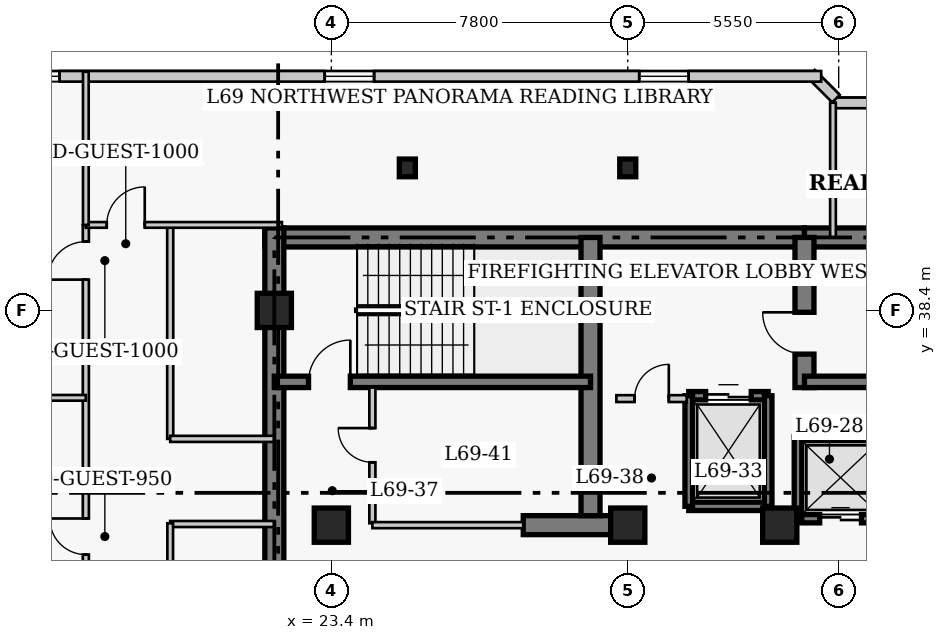
"""IFC4 building model, lengths in metres.
Left out: names, types, materials, properties, quantities, classifications, styles, units other than length and angle.
Written with IfcOpenShell. Run it as: python <this file> out.ifc"""

import sys

from ifc_helpers import new_model, si_unit, direction, frame, frame_2d, origin, origin_2d, place, context, subcontext, project, spatial, rectangle, i_section, extrude, element, fill, save


model = new_model("IFC4")
c1 = context("Model", 3, precision=1e-05, world=origin(), true_north=direction((0.0, 1.0)))
c2 = subcontext(c1, "Body", "Model", "MODEL_VIEW")
j1 = project(units=[si_unit("LENGTHUNIT", "METRE"), si_unit("PLANEANGLEUNIT", "RADIAN")], contexts=[c1])
p1 = place(None, origin())
s1 = spatial("IfcSite", under=j1, at=p1, CompositionType="ELEMENT")
p2 = place(p1, origin())
s2 = spatial("IfcBuilding", under=s1, at=p2, CompositionType="ELEMENT")
p3 = place(p2, frame((0.0, 0.0, 277.4)))
s3 = spatial("IfcBuildingStorey", under=s2, at=p3, CompositionType="ELEMENT", Elevation=277.4)
p4 = place(p3, frame((21.65, 40.32, 0.0), z_axis=(0.0, 0.0, 1.0), x_axis=(1.0, 0.0, 0.0)))
e1 = element("IfcWall", 1, at=p4, inside=s3, PredefinedType="SHEAR", context=c2, shape_type="SweptSolid", body=[
    extrude(rectangle(XDim=14.2, YDim=0.5, at=frame_2d((7.1, 0.0))), origin(), (0.0, 0.0, 1.0), 4.0),
])
p5 = place(p3, frame((35.85, 40.32, 0.0), z_axis=(0.0, 0.0, 1.0), x_axis=(1.0, 0.0, 0.0)))
e2 = element("IfcWall", 2, at=p5, inside=s3, PredefinedType="SHEAR", context=c2, shape_type="SweptSolid", body=[
    extrude(rectangle(XDim=12.6, YDim=0.5, at=frame_2d((6.3, 0.0))), origin(), (0.0, 0.0, 1.0), 4.0),
])
p6 = place(p3, frame((21.9, 27.05, 0.0), z_axis=(0.0, 0.0, 1.0), x_axis=(0.0, 1.0, 0.0)))
e3 = element("IfcWall", 3, at=p6, inside=s3, PredefinedType="SHEAR", context=c2, shape_type="SweptSolid", body=[
    extrude(rectangle(XDim=13.52, YDim=0.5, at=frame_2d((6.76, 0.0))), origin(), (0.0, 0.0, 1.0), 4.0),
])
p7 = place(p3, frame((28.45, 32.75, 0.0), z_axis=(0.0, 0.0, 1.0), x_axis=(1.0, 0.0, 0.0)))
e4 = element("IfcWall", 4, at=p7, inside=s3, PredefinedType="SHEAR", context=c2, shape_type="SweptSolid", body=[
    extrude(rectangle(XDim=2.4, YDim=0.5, at=frame_2d((1.2, 0.0))), origin(), (0.0, 0.0, 1.0), 4.0),
])
p8 = place(p3, frame((30.22, 33.0, 0.0), z_axis=(0.0, 0.0, 1.0), x_axis=(0.0, 1.0, 0.0)))
e5 = element("IfcWall", 5, at=p8, inside=s3, PredefinedType="SHEAR", context=c2, shape_type="SweptSolid", body=[
    extrude(rectangle(XDim=7.32, YDim=0.5, at=frame_2d((3.66, 0.0))), origin(), (0.0, 0.0, 1.0), 4.0),
])
p9 = place(p3, frame((35.85, 36.37, 0.0), z_axis=(0.0, 0.0, 1.0), x_axis=(0.0, 1.0, 0.0)))
e6 = element("IfcWall", 6, at=p9, inside=s3, PredefinedType="SHEAR", context=c2, shape_type="SweptSolid", body=[
    extrude(rectangle(XDim=3.95, YDim=0.5, at=frame_2d((1.975, 0.0))), origin(), (0.0, 0.0, 1.0), 4.0),
])
p10 = place(p9, frame((0.88, 0.0, 0.0)))
e7 = element("IfcOpeningElement", 7, at=p10, cuts=e6, PredefinedType="OPENING", context=c2, shape_type="SweptSolid", body=[
    extrude(rectangle(XDim=1.1, YDim=2.15, at=frame_2d((0.55, 1.075))), frame((0.0, 0.26, 0.0), z_axis=(0.0, -1.0, 0.0), x_axis=(1.0, 0.0, 0.0)), (0.0, 0.0, 1.0), 0.52),
])
p11 = place(p3, frame((21.9, 36.52, 0.0), z_axis=(0.0, 0.0, 1.0), x_axis=(1.0, 0.0, 0.0)))
e8 = element("IfcWall", 8, at=p11, inside=s3, PredefinedType="SHEAR", context=c2, shape_type="SweptSolid", body=[
    extrude(rectangle(XDim=8.32, YDim=0.3, at=frame_2d((4.16, 0.0))), origin(), (0.0, 0.0, 1.0), 4.0),
])
p12 = place(p11, frame((0.9, 0.0, 0.0)))
e9 = element("IfcOpeningElement", 9, at=p12, cuts=e8, PredefinedType="OPENING", context=c2, shape_type="SweptSolid", body=[
    extrude(rectangle(XDim=1.1, YDim=2.15, at=frame_2d((0.55, 1.075))), frame((0.0, 0.16, 0.0), z_axis=(0.0, -1.0, 0.0), x_axis=(1.0, 0.0, 0.0)), (0.0, 0.0, 1.0), 0.32),
])
p13 = place(p3, frame((35.85, 36.52, 0.0), z_axis=(0.0, 0.0, 1.0), x_axis=(1.0, 0.0, 0.0)))
e10 = element("IfcWall", 10, at=p13, inside=s3, PredefinedType="SHEAR", context=c2, shape_type="SweptSolid", body=[
    extrude(rectangle(XDim=8.33, YDim=0.3, at=frame_2d((4.165, 0.0))), origin(), (0.0, 0.0, 1.0), 4.0),
])
for number, where, z_axis, x_axis in (
    (11, (21.9, 38.4, 0.0), (0.0, 0.0, 1.0), (1.0, 0.0, 0.0)),
    (12, (23.4, 32.75, 0.0), (0.0, 0.0, 1.0), (1.0, 0.0, 0.0)),
    (13, (31.2, 32.75, 0.0), (0.0, 0.0, 1.0), (1.0, 0.0, 0.0)),
    (14, (35.2, 32.75, 0.0), (0.0, 0.0, 1.0), (1.0, 0.0, 0.0)),
):
    element("IfcColumn", number, at=place(p3, frame(where, z_axis=z_axis, x_axis=x_axis)), inside=s3, PredefinedType="COLUMN", context=c2, shape_type="SweptSolid", body=[
        extrude(rectangle(XDim=0.9, YDim=0.9, at=origin_2d()), origin(), (0.0, 0.0, 1.0), 4.0),
    ])
for number, where, z_axis, x_axis in (
    (15, (25.4, 42.15, 0.0), (0.0, 0.0, 1.0), (1.0, 0.0, 0.0)),
    (16, (31.2, 42.15, 0.0), (0.0, 0.0, 1.0), (1.0, 0.0, 0.0)),
):
    element("IfcColumn", number, at=place(p3, frame(where, z_axis=z_axis, x_axis=x_axis)), inside=s3, PredefinedType="COLUMN", context=c2, shape_type="SweptSolid", body=[
        extrude(i_section(OverallWidth=0.422, OverallDepth=0.465, WebThickness=0.045, FlangeThickness=0.073, FilletRadius=0.017, at=origin_2d()), origin(), (0.0, 0.0, 1.0), 4.0),
    ])
p14 = place(p3, frame((41.39, 43.86, 0.0), z_axis=(0.0, 0.0, 1.0), x_axis=(-1.0, 0.0, 0.0)))
e17 = element("IfcWall", 17, at=p14, inside=s3, PredefinedType="SOLIDWALL", context=c2, shape_type="SweptSolid", body=[
    extrude(rectangle(XDim=4.78, YDim=0.28, at=frame_2d((2.39, 0.0))), origin(), (0.0, 0.0, 1.0), 3.76),
])
p15 = place(p14, frame((1.74, 0.0, 0.85)))
e18 = element("IfcOpeningElement", 18, at=p15, cuts=e17, PredefinedType="OPENING", context=c2, shape_type="SweptSolid", body=[
    extrude(rectangle(XDim=1.3, YDim=1.7, at=frame_2d((0.65, 0.85))), frame((0.0, 0.15, 0.0), z_axis=(0.0, -1.0, 0.0), x_axis=(1.0, 0.0, 0.0)), (0.0, 0.0, 1.0), 0.3),
])
p16 = place(p3, frame((36.679, 43.973, 0.0), z_axis=(0.0, 0.0, 1.0), x_axis=(-0.706975312048, 0.707238225886, 0.0)))
e19 = element("IfcWall", 19, at=p16, inside=s3, PredefinedType="SOLIDWALL", context=c2, shape_type="SweptSolid", body=[
    extrude(rectangle(XDim=0.929, YDim=0.28, at=frame_2d((0.464, 0.0))), origin(), (0.0, 0.0, 1.0), 3.76),
])
p17 = place(p3, frame((36.29, 44.56, 0.0), z_axis=(0.0, 0.0, 1.0), x_axis=(-1.0, 0.0, 0.0)))
e20 = element("IfcWall", 20, at=p17, inside=s3, PredefinedType="SOLIDWALL", context=c2, shape_type="SweptSolid", body=[
    extrude(rectangle(XDim=24.83, YDim=0.28, at=frame_2d((12.415, 0.0))), origin(), (0.0, 0.0, 1.0), 3.76),
])
p18 = place(p17, frame((3.488, 0.0, 0.85)))
e21 = element("IfcOpeningElement", 21, at=p18, cuts=e20, PredefinedType="OPENING", context=c2, shape_type="SweptSolid", body=[
    extrude(rectangle(XDim=1.3, YDim=1.7, at=frame_2d((0.65, 0.85))), frame((0.0, 0.15, 0.0), z_axis=(0.0, -1.0, 0.0), x_axis=(1.0, 0.0, 0.0)), (0.0, 0.0, 1.0), 0.3),
])
p19 = place(p17, frame((11.765, 0.0, 0.85)))
e22 = element("IfcOpeningElement", 22, at=p19, cuts=e20, PredefinedType="OPENING", context=c2, shape_type="SweptSolid", body=[
    extrude(rectangle(XDim=1.3, YDim=1.7, at=frame_2d((0.65, 0.85))), frame((0.0, 0.15, 0.0), z_axis=(0.0, -1.0, 0.0), x_axis=(1.0, 0.0, 0.0)), (0.0, 0.0, 1.0), 0.3),
])
p20 = place(p17, frame((20.042, 0.0, 0.85)))
e23 = element("IfcOpeningElement", 23, at=p20, cuts=e20, PredefinedType="OPENING", context=c2, shape_type="SweptSolid", body=[
    extrude(rectangle(XDim=1.3, YDim=1.7, at=frame_2d((0.65, 0.85))), frame((0.0, 0.15, 0.0), z_axis=(0.0, -1.0, 0.0), x_axis=(1.0, 0.0, 0.0)), (0.0, 0.0, 1.0), 0.3),
])
p21 = place(p3, frame((35.68, 35.08, 0.0), z_axis=(0.0, 0.0, 1.0), x_axis=(1.0, 0.0, 0.0)))
e24 = element("IfcWall", 24, at=p21, inside=s3, PredefinedType="SHEAR", context=c2, shape_type="SweptSolid", body=[
    extrude(rectangle(XDim=2.32, YDim=0.22, at=frame_2d((1.16, 0.0))), origin(), (0.0, 0.0, 1.0), 4.0),
])
p22 = place(p3, frame((35.68, 32.92, 0.0), z_axis=(0.0, 0.0, 1.0), x_axis=(1.0, 0.0, 0.0)))
e25 = element("IfcWall", 25, at=p22, inside=s3, PredefinedType="SHEAR", context=c2, shape_type="SweptSolid", body=[
    extrude(rectangle(XDim=2.32, YDim=0.22, at=frame_2d((1.16, 0.0))), origin(), (0.0, 0.0, 1.0), 4.0),
])
p23 = place(p22, frame((0.57, 0.0, 0.0)))
e26 = element("IfcOpeningElement", 26, at=p23, cuts=e25, PredefinedType="OPENING", context=c2, shape_type="SweptSolid", body=[
    extrude(rectangle(XDim=1.1, YDim=2.15, at=frame_2d((0.55, 1.075))), frame((0.0, 0.12, 0.0), z_axis=(0.0, -1.0, 0.0), x_axis=(1.0, 0.0, 0.0)), (0.0, 0.0, 1.0), 0.24),
])
p24 = place(p3, frame((35.68, 32.92, 0.0), z_axis=(0.0, 0.0, 1.0), x_axis=(0.0, 1.0, 0.0)))
e27 = element("IfcWall", 27, at=p24, inside=s3, PredefinedType="SHEAR", context=c2, shape_type="SweptSolid", body=[
    extrude(rectangle(XDim=2.16, YDim=0.2, at=frame_2d((1.08, 0.0))), origin(), (0.0, 0.0, 1.0), 4.0),
])
p25 = place(p3, frame((32.805, 36.155, 0.0), z_axis=(0.0, 0.0, 1.0), x_axis=(1.0, 0.0, 0.0)))
e28 = element("IfcWall", 28, at=p25, inside=s3, PredefinedType="SHEAR", context=c2, shape_type="SweptSolid", body=[
    extrude(rectangle(XDim=2.09, YDim=0.22, at=frame_2d((1.045, 0.0))), origin(), (0.0, 0.0, 1.0), 4.0),
])
p26 = place(p25, frame((0.445, 0.0, 0.0)))
e29 = element("IfcOpeningElement", 29, at=p26, cuts=e28, PredefinedType="OPENING", context=c2, shape_type="SweptSolid", body=[
    extrude(rectangle(XDim=1.2, YDim=2.15, at=frame_2d((0.6, 1.075))), frame((0.0, 0.12, 0.0), z_axis=(0.0, -1.0, 0.0), x_axis=(1.0, 0.0, 0.0)), (0.0, 0.0, 1.0), 0.24),
])
p27 = place(p3, frame((32.805, 33.245, 0.0), z_axis=(0.0, 0.0, 1.0), x_axis=(1.0, 0.0, 0.0)))
e30 = element("IfcWall", 30, at=p27, inside=s3, PredefinedType="SHEAR", context=c2, shape_type="SweptSolid", body=[
    extrude(rectangle(XDim=2.09, YDim=0.22, at=frame_2d((1.045, 0.0))), origin(), (0.0, 0.0, 1.0), 4.0),
])
for number, where, z_axis, x_axis in (
    (31, (32.805, 33.245, 0.0), (0.0, 0.0, 1.0), (0.0, 1.0, 0.0)),
    (32, (34.895, 33.245, 0.0), (0.0, 0.0, 1.0), (0.0, 1.0, 0.0)),
):
    element("IfcWall", number, at=place(p3, frame(where, z_axis=z_axis, x_axis=x_axis)), inside=s3, PredefinedType="SHEAR", context=c2, shape_type="SweptSolid", body=[
        extrude(rectangle(XDim=2.91, YDim=0.2, at=frame_2d((1.455, 0.0))), origin(), (0.0, 0.0, 1.0), 4.0),
    ])
p28 = place(p3, frame((30.9, 36.08, 0.0), z_axis=(0.0, 0.0, 1.0), x_axis=(1.0, 0.0, 0.0)))
e33 = element("IfcWall", 33, at=p28, inside=s3, PredefinedType="PARTITIONING", context=c2, shape_type="SweptSolid", body=[
    extrude(rectangle(XDim=1.85, YDim=0.18, at=frame_2d((0.925, 0.0))), origin(), (0.0, 0.0, 1.0), 3.76),
])
p29 = place(p28, frame((0.48, 0.0, 0.0)))
e34 = element("IfcOpeningElement", 34, at=p29, cuts=e33, PredefinedType="OPENING", context=c2, shape_type="SweptSolid", body=[
    extrude(rectangle(XDim=0.9, YDim=2.15, at=frame_2d((0.45, 1.075))), frame((0.0, 0.1, 0.0), z_axis=(0.0, -1.0, 0.0), x_axis=(1.0, 0.0, 0.0)), (0.0, 0.0, 1.0), 0.2),
])
p30 = place(p3, frame((24.48, 32.8, 0.0), z_axis=(0.0, 0.0, 1.0), x_axis=(0.0, 1.0, 0.0)))
e35 = element("IfcWall", 35, at=p30, inside=s3, PredefinedType="PARTITIONING", context=c2, shape_type="SweptSolid", body=[
    extrude(rectangle(XDim=3.57, YDim=0.16, at=frame_2d((1.785, 0.0))), origin(), (0.0, 0.0, 1.0), 3.76),
])
p31 = place(p30, frame((1.604, 0.0, 0.0)))
e36 = element("IfcOpeningElement", 36, at=p31, cuts=e35, PredefinedType="OPENING", context=c2, shape_type="SweptSolid", body=[
    extrude(rectangle(XDim=0.9, YDim=2.1, at=frame_2d((0.45, 1.05))), frame((0.0, 0.09, 0.0), z_axis=(0.0, -1.0, 0.0), x_axis=(1.0, 0.0, 0.0)), (0.0, 0.0, 1.0), 0.18),
])
p32 = place(p3, frame((24.48, 32.75, 0.0), z_axis=(0.0, 0.0, 1.0), x_axis=(1.0, 0.0, 0.0)))
e37 = element("IfcWall", 37, at=p32, inside=s3, PredefinedType="PARTITIONING", context=c2, shape_type="SweptSolid", body=[
    extrude(rectangle(XDim=3.97, YDim=0.16, at=frame_2d((1.985, 0.0))), origin(), (0.0, 0.0, 1.0), 3.76),
])
p33 = place(p3, frame((16.94, 8.55, 0.0), z_axis=(0.0, 0.0, 1.0), x_axis=(0.0, 1.0, 0.0)))
e38 = element("IfcWall", 38, at=p33, inside=s3, PredefinedType="PARTITIONING", context=c2, shape_type="SweptSolid", body=[
    extrude(rectangle(XDim=32.1, YDim=0.16, at=frame_2d((16.05, 0.0))), origin(), (0.0, 0.0, 1.0), 3.76),
])
p34 = place(p33, frame((5.25, 0.0, 0.0)))
e39 = element("IfcOpeningElement", 39, at=p34, cuts=e38, PredefinedType="OPENING", context=c2, shape_type="SweptSolid", body=[
    extrude(rectangle(XDim=0.95, YDim=2.1, at=frame_2d((0.475, 1.05))), frame((0.0, 0.09, 0.0), z_axis=(0.0, -1.0, 0.0), x_axis=(1.0, 0.0, 0.0)), (0.0, 0.0, 1.0), 0.18),
])
p35 = place(p33, frame((15.375, 0.0, 0.0)))
e40 = element("IfcOpeningElement", 40, at=p35, cuts=e38, PredefinedType="OPENING", context=c2, shape_type="SweptSolid", body=[
    extrude(rectangle(XDim=0.95, YDim=2.1, at=frame_2d((0.475, 1.05))), frame((0.0, 0.09, 0.0), z_axis=(0.0, -1.0, 0.0), x_axis=(1.0, 0.0, 0.0)), (0.0, 0.0, 1.0), 0.18),
])
p36 = place(p33, frame((23.425, 0.0, 0.0)))
e41 = element("IfcOpeningElement", 41, at=p36, cuts=e38, PredefinedType="OPENING", context=c2, shape_type="SweptSolid", body=[
    extrude(rectangle(XDim=0.95, YDim=2.1, at=frame_2d((0.475, 1.05))), frame((0.0, 0.09, 0.0), z_axis=(0.0, -1.0, 0.0), x_axis=(1.0, 0.0, 0.0)), (0.0, 0.0, 1.0), 0.18),
])
p37 = place(p33, frame((30.66, 0.0, 0.0)))
e42 = element("IfcOpeningElement", 42, at=p37, cuts=e38, PredefinedType="OPENING", context=c2, shape_type="SweptSolid", body=[
    extrude(rectangle(XDim=1.0, YDim=2.15, at=frame_2d((0.5, 1.075))), frame((0.0, 0.09, 0.0), z_axis=(0.0, -1.0, 0.0), x_axis=(1.0, 0.0, 0.0)), (0.0, 0.0, 1.0), 0.18),
])
p38 = place(p3, frame((19.16, 35.02, 0.0), z_axis=(0.0, 0.0, 1.0), x_axis=(0.0, 1.0, 0.0)))
e43 = element("IfcWall", 43, at=p38, inside=s3, PredefinedType="PARTITIONING", context=c2, shape_type="SweptSolid", body=[
    extrude(rectangle(XDim=5.63, YDim=0.16, at=frame_2d((2.815, 0.0))), origin(), (0.0, 0.0, 1.0), 3.76),
])
for number, where, z_axis, x_axis in (
    (44, (19.16, 35.02, 0.0), (0.0, 0.0, 1.0), (1.0, 0.0, 0.0)),
    (45, (19.16, 32.78, 0.0), (0.0, 0.0, 1.0), (1.0, 0.0, 0.0)),
):
    element("IfcWall", number, at=place(p3, frame(where, z_axis=z_axis, x_axis=x_axis)), inside=s3, PredefinedType="PARTITIONING", context=c2, shape_type="SweptSolid", body=[
        extrude(rectangle(XDim=2.74, YDim=0.16, at=frame_2d((1.37, 0.0))), origin(), (0.0, 0.0, 1.0), 3.76),
    ])
p39 = place(p3, frame((16.94, 40.65, 0.0), z_axis=(0.0, 0.0, 1.0), x_axis=(1.0, 0.0, 0.0)))
e46 = element("IfcWall", 46, at=p39, inside=s3, PredefinedType="PARTITIONING", context=c2, shape_type="SweptSolid", body=[
    extrude(rectangle(XDim=5.16, YDim=0.15, at=frame_2d((2.58, 0.0))), origin(), (0.0, 0.0, 1.0), 3.76),
])
p40 = place(p39, frame((0.55, 0.0, 0.0)))
e47 = element("IfcOpeningElement", 47, at=p40, cuts=e46, PredefinedType="OPENING", context=c2, shape_type="SweptSolid", body=[
    extrude(rectangle(XDim=1.0, YDim=2.15, at=frame_2d((0.5, 1.075))), frame((0.0, 0.085, 0.0), z_axis=(0.0, -1.0, 0.0), x_axis=(1.0, 0.0, 0.0)), (0.0, 0.0, 1.0), 0.17),
])
p41 = place(p3, frame((19.16, 24.71, 0.0), z_axis=(0.0, 0.0, 1.0), x_axis=(0.0, 1.0, 0.0)))
e48 = element("IfcWall", 48, at=p41, inside=s3, PredefinedType="PARTITIONING", context=c2, shape_type="SweptSolid", body=[
    extrude(rectangle(XDim=8.09, YDim=0.15, at=frame_2d((4.045, 0.0))), origin(), (0.0, 0.0, 1.0), 3.76),
])
p42 = place(p3, frame((16.94, 40.65, 0.0), z_axis=(0.0, 0.0, 1.0), x_axis=(0.0, 1.0, 0.0)))
e49 = element("IfcWall", 49, at=p42, inside=s3, PredefinedType="PARTITIONING", context=c2, shape_type="SweptSolid", body=[
    extrude(rectangle(XDim=4.03, YDim=0.15, at=frame_2d((2.015, 0.0))), origin(), (0.0, 0.0, 1.0), 3.76),
])
p43 = place(p3, frame((36.6, 40.32, 0.0), z_axis=(0.0, 0.0, 1.0), x_axis=(0.0, 1.0, 0.0)))
e50 = element("IfcWall", 50, at=p43, inside=s3, PredefinedType="PARTITIONING", context=c2, shape_type="SweptSolid", body=[
    extrude(rectangle(XDim=3.545, YDim=0.15, at=frame_2d((1.772, 0.0))), origin(), (0.0, 0.0, 1.0), 3.76),
])
p44 = place(p3, frame((14.45, 36.1, 0.0), z_axis=(0.0, 0.0, 1.0), x_axis=(1.0, 0.0, 0.0)))
e51 = element("IfcWall", 51, at=p44, inside=s3, PredefinedType="PARTITIONING", context=c2, shape_type="SweptSolid", body=[
    extrude(rectangle(XDim=2.49, YDim=0.15, at=frame_2d((1.245, 0.0))), origin(), (0.0, 0.0, 1.0), 3.76),
])
p45 = place(p18, origin())
e52 = element("IfcWindow", 52, at=p45, inside=s3, PartitioningType="SINGLE_PANEL", PredefinedType="WINDOW", context=c2, shape_type="SweptSolid", body=[
    extrude(rectangle(XDim=1.3, YDim=1.7, at=frame_2d((0.65, 0.85))), frame((0.0, 0.03, 0.0), z_axis=(0.0, -1.0, 0.0), x_axis=(1.0, 0.0, 0.0)), (0.0, 0.0, 1.0), 0.06),
])
fill(e21, e52)
p46 = place(p19, origin())
e53 = element("IfcWindow", 53, at=p46, inside=s3, PartitioningType="SINGLE_PANEL", PredefinedType="WINDOW", context=c2, shape_type="SweptSolid", body=[
    extrude(rectangle(XDim=1.3, YDim=1.7, at=frame_2d((0.65, 0.85))), frame((0.0, 0.03, 0.0), z_axis=(0.0, -1.0, 0.0), x_axis=(1.0, 0.0, 0.0)), (0.0, 0.0, 1.0), 0.06),
])
fill(e22, e53)
p47 = place(p20, origin())
e54 = element("IfcWindow", 54, at=p47, inside=s3, PartitioningType="SINGLE_PANEL", PredefinedType="WINDOW", context=c2, shape_type="SweptSolid", body=[
    extrude(rectangle(XDim=1.3, YDim=1.7, at=frame_2d((0.65, 0.85))), frame((0.0, 0.03, 0.0), z_axis=(0.0, -1.0, 0.0), x_axis=(1.0, 0.0, 0.0)), (0.0, 0.0, 1.0), 0.06),
])
fill(e23, e54)
p48 = place(p23, origin())
e55 = element("IfcDoor", 55, at=p48, inside=s3, OperationType="DOUBLE_DOOR_SLIDING", PredefinedType="DOOR", context=c2, shape_type="SweptSolid", body=[
    extrude(rectangle(XDim=1.1, YDim=2.15, at=frame_2d((0.55, 1.075))), frame((0.0, 0.025, 0.0), z_axis=(0.0, -1.0, 0.0), x_axis=(1.0, 0.0, 0.0)), (0.0, 0.0, 1.0), 0.05),
])
fill(e26, e55)
p49 = place(p26, origin())
e56 = element("IfcDoor", 56, at=p49, inside=s3, OperationType="DOUBLE_DOOR_SLIDING", PredefinedType="DOOR", context=c2, shape_type="SweptSolid", body=[
    extrude(rectangle(XDim=1.2, YDim=2.15, at=frame_2d((0.6, 1.075))), frame((0.0, 0.025, 0.0), z_axis=(0.0, -1.0, 0.0), x_axis=(1.0, 0.0, 0.0)), (0.0, 0.0, 1.0), 0.05),
])
fill(e29, e56)
p50 = place(p29, origin())
e57 = element("IfcDoor", 57, at=p50, inside=s3, OperationType="SINGLE_SWING_RIGHT", PredefinedType="DOOR", context=c2, shape_type="SweptSolid", body=[
    extrude(rectangle(XDim=0.9, YDim=2.15, at=frame_2d((0.45, 1.075))), frame((0.0, 0.025, 0.0), z_axis=(0.0, -1.0, 0.0), x_axis=(1.0, 0.0, 0.0)), (0.0, 0.0, 1.0), 0.05),
])
fill(e34, e57)
p51 = place(p31, origin())
e58 = element("IfcDoor", 58, at=p51, inside=s3, OperationType="SINGLE_SWING_RIGHT", PredefinedType="DOOR", context=c2, shape_type="SweptSolid", body=[
    extrude(rectangle(XDim=0.9, YDim=2.1, at=frame_2d((0.45, 1.05))), frame((0.0, 0.025, 0.0), z_axis=(0.0, -1.0, 0.0), x_axis=(1.0, 0.0, 0.0)), (0.0, 0.0, 1.0), 0.05),
])
fill(e36, e58)
p52 = place(p40, origin())
e59 = element("IfcDoor", 59, at=p52, inside=s3, OperationType="SINGLE_SWING_RIGHT", PredefinedType="DOOR", context=c2, shape_type="SweptSolid", body=[
    extrude(rectangle(XDim=1.0, YDim=2.15, at=frame_2d((0.5, 1.075))), frame((0.0, 0.025, 0.0), z_axis=(0.0, -1.0, 0.0), x_axis=(1.0, 0.0, 0.0)), (0.0, 0.0, 1.0), 0.05),
])
fill(e47, e59)
p53 = place(p36, origin())
e60 = element("IfcDoor", 60, at=p53, inside=s3, OperationType="SINGLE_SWING_RIGHT", PredefinedType="DOOR", context=c2, shape_type="SweptSolid", body=[
    extrude(rectangle(XDim=0.95, YDim=2.1, at=frame_2d((0.475, 1.05))), frame((0.0, 0.025, 0.0), z_axis=(0.0, -1.0, 0.0), x_axis=(1.0, 0.0, 0.0)), (0.0, 0.0, 1.0), 0.05),
])
fill(e41, e60)
p54 = place(p37, origin())
e61 = element("IfcDoor", 61, at=p54, inside=s3, OperationType="SINGLE_SWING_LEFT", PredefinedType="DOOR", context=c2, shape_type="SweptSolid", body=[
    extrude(rectangle(XDim=1.0, YDim=2.15, at=frame_2d((0.5, 1.075))), frame((0.0, 0.025, 0.0), z_axis=(0.0, -1.0, 0.0), x_axis=(1.0, 0.0, 0.0)), (0.0, 0.0, 1.0), 0.05),
])
fill(e42, e61)
p55 = place(p12, origin())
e62 = element("IfcDoor", 62, at=p55, inside=s3, OperationType="SINGLE_SWING_RIGHT", PredefinedType="DOOR", context=c2, shape_type="SweptSolid", body=[
    extrude(rectangle(XDim=1.1, YDim=2.15, at=frame_2d((0.55, 1.075))), frame((0.0, 0.025, 0.0), z_axis=(0.0, -1.0, 0.0), x_axis=(1.0, 0.0, 0.0)), (0.0, 0.0, 1.0), 0.05),
])
fill(e9, e62)
p56 = place(p10, origin())
e63 = element("IfcDoor", 63, at=p56, inside=s3, OperationType="SINGLE_SWING_RIGHT", PredefinedType="DOOR", context=c2, shape_type="SweptSolid", body=[
    extrude(rectangle(XDim=1.1, YDim=2.15, at=frame_2d((0.55, 1.075))), frame((0.0, 0.025, 0.0), z_axis=(0.0, -1.0, 0.0), x_axis=(1.0, 0.0, 0.0)), (0.0, 0.0, 1.0), 0.05),
])
fill(e7, e63)
save(model, sys.argv[1])
